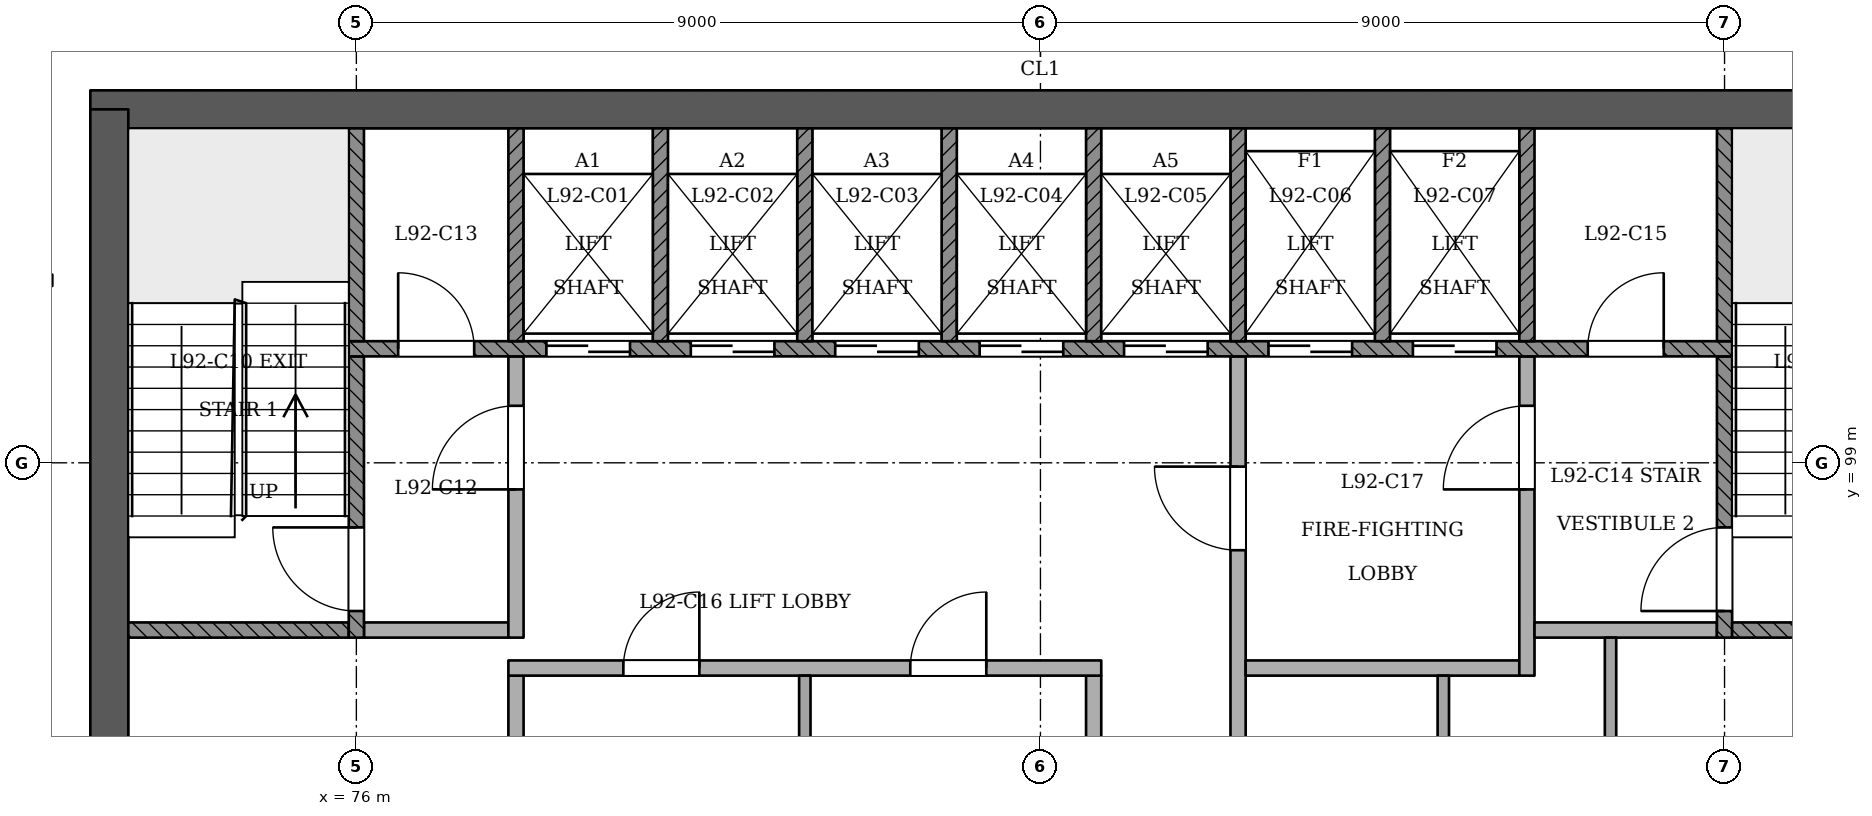
"""IFC4 building model, lengths in metres.
Left out: names, types, materials, properties, quantities, classifications, styles, units other than length and angle.
Written with IfcOpenShell. Run it as: python <this file> out.ifc"""

import sys

from ifc_helpers import new_model, si_unit, direction, frame, frame_2d, origin, place, context, subcontext, project, spatial, rectangle, extrude, element, fill, save


model = new_model("IFC4")
c1 = context("Model", 3, precision=1e-05, world=origin(), true_north=direction((0.0, 1.0)))
c2 = subcontext(c1, "Body", "Model", "MODEL_VIEW")
j1 = project(units=[si_unit("LENGTHUNIT", "METRE"), si_unit("PLANEANGLEUNIT", "RADIAN")], contexts=[c1])
p1 = place(None, origin())
s1 = spatial("IfcSite", under=j1, at=p1, CompositionType="ELEMENT")
p2 = place(p1, origin())
s2 = spatial("IfcBuilding", under=s1, at=p2, CompositionType="ELEMENT")
p3 = place(p2, frame((0.0, 0.0, 354.4)))
s3 = spatial("IfcBuildingStorey", under=s2, at=p3, CompositionType="ELEMENT", Elevation=354.4)
p4 = place(p3, frame((97.25, 103.65, 0.0), z_axis=(0.0, 0.0, 1.0), x_axis=(-1.0, 0.0, 0.0)))
e1 = element("IfcWall", 1, at=p4, inside=s3, PredefinedType="SHEAR", context=c2, shape_type="SweptSolid", body=[
    extrude(rectangle(XDim=24.75, YDim=0.5, at=frame_2d((12.375, 0.0))), origin(), (0.0, 0.0, 1.0), 3.6),
])
p5 = place(p3, frame((72.75, 103.65, 0.0), z_axis=(0.0, 0.0, 1.0), x_axis=(0.0, -1.0, 0.0)))
e2 = element("IfcWall", 2, at=p5, inside=s3, PredefinedType="SHEAR", context=c2, shape_type="SweptSolid", body=[
    extrude(rectangle(XDim=10.75, YDim=0.5, at=frame_2d((5.375, 0.0))), origin(), (0.0, 0.0, 1.0), 3.6),
])
p6 = place(p3, frame((78.1, 93.4, 0.0), z_axis=(0.0, 0.0, 1.0), x_axis=(0.0, 1.0, 0.0)))
e3 = element("IfcWall", 3, at=p6, inside=s3, PredefinedType="PARTITIONING", context=c2, shape_type="SweptSolid", body=[
    extrude(rectangle(XDim=2.8, YDim=0.2, at=frame_2d((1.4, 0.0))), origin(), (0.0, 0.0, 1.0), 3.3),
])
p7 = place(p3, frame((81.9, 93.4, 0.0), z_axis=(0.0, 0.0, 1.0), x_axis=(0.0, 1.0, 0.0)))
e4 = element("IfcWall", 4, at=p7, inside=s3, PredefinedType="PARTITIONING", context=c2, shape_type="SweptSolid", body=[
    extrude(rectangle(XDim=2.8, YDim=0.15, at=frame_2d((1.4, 0.0))), origin(), (0.0, 0.0, 1.0), 3.3),
])
p8 = place(p3, frame((85.7, 93.4, 0.0), z_axis=(0.0, 0.0, 1.0), x_axis=(0.0, 1.0, 0.0)))
e5 = element("IfcWall", 5, at=p8, inside=s3, PredefinedType="PARTITIONING", context=c2, shape_type="SweptSolid", body=[
    extrude(rectangle(XDim=2.8, YDim=0.2, at=frame_2d((1.4, 0.0))), origin(), (0.0, 0.0, 1.0), 3.3),
])
p9 = place(p3, frame((87.6, 93.4, 0.0), z_axis=(0.0, 0.0, 1.0), x_axis=(0.0, 1.0, 0.0)))
e6 = element("IfcWall", 6, at=p9, inside=s3, PredefinedType="PARTITIONING", context=c2, shape_type="SweptSolid", body=[
    extrude(rectangle(XDim=7.0, YDim=0.2, at=frame_2d((3.5, 0.0))), origin(), (0.0, 0.0, 1.0), 3.3),
])
p10 = place(p9, frame((4.45, 0.0, 0.0)))
e7 = element("IfcOpeningElement", 7, at=p10, cuts=e6, PredefinedType="OPENING", context=c2, shape_type="SweptSolid", body=[
    extrude(rectangle(XDim=1.1, YDim=2.1, at=frame_2d((0.55, 1.05))), frame((0.0, 0.11, 0.0), z_axis=(0.0, -1.0, 0.0), x_axis=(1.0, 0.0, 0.0)), (0.0, 0.0, 1.0), 0.221),
])
p11 = place(p3, frame((90.3, 93.4, 0.0), z_axis=(0.0, 0.0, 1.0), x_axis=(0.0, 1.0, 0.0)))
e8 = element("IfcWall", 8, at=p11, inside=s3, PredefinedType="PARTITIONING", context=c2, shape_type="SweptSolid", body=[
    extrude(rectangle(XDim=2.8, YDim=0.15, at=frame_2d((1.4, 0.0))), origin(), (0.0, 0.0, 1.0), 3.3),
])
p12 = place(p3, frame((92.5, 93.4, 0.0), z_axis=(0.0, 0.0, 1.0), x_axis=(0.0, 1.0, 0.0)))
e9 = element("IfcWall", 9, at=p12, inside=s3, PredefinedType="PARTITIONING", context=c2, shape_type="SweptSolid", body=[
    extrude(rectangle(XDim=3.3, YDim=0.15, at=frame_2d((1.65, 0.0))), origin(), (0.0, 0.0, 1.0), 3.3),
])
p13 = place(p3, frame((78.0, 96.3, 0.0), z_axis=(0.0, 0.0, 1.0), x_axis=(1.0, 0.0, 0.0)))
e10 = element("IfcWall", 10, at=p13, inside=s3, PredefinedType="PARTITIONING", context=c2, shape_type="SweptSolid", body=[
    extrude(rectangle(XDim=7.8, YDim=0.2, at=frame_2d((3.9, 0.0))), origin(), (0.0, 0.0, 1.0), 3.3),
])
p14 = place(p13, frame((1.512, 0.0, 0.0)))
e11 = element("IfcOpeningElement", 11, at=p14, cuts=e10, PredefinedType="OPENING", context=c2, shape_type="SweptSolid", body=[
    extrude(rectangle(XDim=1.0, YDim=2.1, at=frame_2d((0.5, 1.05))), frame((0.0, 0.11, 0.0), z_axis=(0.0, -1.0, 0.0), x_axis=(1.0, 0.0, 0.0)), (0.0, 0.0, 1.0), 0.221),
])
p15 = place(p13, frame((5.288, 0.0, 0.0)))
e12 = element("IfcOpeningElement", 12, at=p15, cuts=e10, PredefinedType="OPENING", context=c2, shape_type="SweptSolid", body=[
    extrude(rectangle(XDim=1.0, YDim=2.1, at=frame_2d((0.5, 1.05))), frame((0.0, 0.11, 0.0), z_axis=(0.0, -1.0, 0.0), x_axis=(1.0, 0.0, 0.0)), (0.0, 0.0, 1.0), 0.221),
])
p16 = place(p3, frame((87.7, 96.3, 0.0), z_axis=(0.0, 0.0, 1.0), x_axis=(1.0, 0.0, 0.0)))
e13 = element("IfcWall", 13, at=p16, inside=s3, PredefinedType="PARTITIONING", context=c2, shape_type="SweptSolid", body=[
    extrude(rectangle(XDim=3.6, YDim=0.2, at=frame_2d((1.8, 0.0))), origin(), (0.0, 0.0, 1.0), 3.3),
])
p17 = place(p3, frame((91.4, 96.2, 0.0), z_axis=(0.0, 0.0, 1.0), x_axis=(0.0, 1.0, 0.0)))
e14 = element("IfcWall", 14, at=p17, inside=s3, PredefinedType="PARTITIONING", context=c2, shape_type="SweptSolid", body=[
    extrude(rectangle(XDim=4.2, YDim=0.2, at=frame_2d((2.1, 0.0))), origin(), (0.0, 0.0, 1.0), 3.3),
])
p18 = place(p17, frame((2.45, 0.0, 0.0)))
e15 = element("IfcOpeningElement", 15, at=p18, cuts=e14, PredefinedType="OPENING", context=c2, shape_type="SweptSolid", body=[
    extrude(rectangle(XDim=1.1, YDim=2.1, at=frame_2d((0.55, 1.05))), frame((0.0, 0.11, 0.0), z_axis=(0.0, -1.0, 0.0), x_axis=(1.0, 0.0, 0.0)), (0.0, 0.0, 1.0), 0.221),
])
p19 = place(p3, frame((73.0, 96.8, 0.0), z_axis=(0.0, 0.0, 1.0), x_axis=(1.0, 0.0, 0.0)))
e16 = element("IfcWall", 16, at=p19, inside=s3, PredefinedType="SOLIDWALL", context=c2, shape_type="SweptSolid", body=[
    extrude(rectangle(XDim=2.9, YDim=0.2, at=frame_2d((1.45, 0.0))), origin(), (0.0, 0.0, 1.0), 3.3),
])
p20 = place(p3, frame((76.0, 96.7, 0.0), z_axis=(0.0, 0.0, 1.0), x_axis=(0.0, 1.0, 0.0)))
e17 = element("IfcWall", 17, at=p20, inside=s3, PredefinedType="SOLIDWALL", context=c2, shape_type="SweptSolid", body=[
    extrude(rectangle(XDim=3.7, YDim=0.2, at=frame_2d((1.85, 0.0))), origin(), (0.0, 0.0, 1.0), 3.3),
])
p21 = place(p20, frame((0.35, 0.0, 0.0)))
e18 = element("IfcOpeningElement", 18, at=p21, cuts=e17, PredefinedType="OPENING", context=c2, shape_type="SweptSolid", body=[
    extrude(rectangle(XDim=1.1, YDim=2.1, at=frame_2d((0.55, 1.05))), frame((0.0, 0.11, 0.0), z_axis=(0.0, -1.0, 0.0), x_axis=(1.0, 0.0, 0.0)), (0.0, 0.0, 1.0), 0.221),
])
p22 = place(p3, frame((76.1, 96.8, 0.0), z_axis=(0.0, 0.0, 1.0), x_axis=(1.0, 0.0, 0.0)))
e19 = element("IfcWall", 19, at=p22, inside=s3, PredefinedType="PARTITIONING", context=c2, shape_type="SweptSolid", body=[
    extrude(rectangle(XDim=1.9, YDim=0.2, at=frame_2d((0.95, 0.0))), origin(), (0.0, 0.0, 1.0), 3.3),
])
p23 = place(p3, frame((78.1, 96.7, 0.0), z_axis=(0.0, 0.0, 1.0), x_axis=(0.0, 1.0, 0.0)))
e20 = element("IfcWall", 20, at=p23, inside=s3, PredefinedType="PARTITIONING", context=c2, shape_type="SweptSolid", body=[
    extrude(rectangle(XDim=3.7, YDim=0.2, at=frame_2d((1.85, 0.0))), origin(), (0.0, 0.0, 1.0), 3.3),
])
p24 = place(p23, frame((1.95, 0.0, 0.0)))
e21 = element("IfcOpeningElement", 21, at=p24, cuts=e20, PredefinedType="OPENING", context=c2, shape_type="SweptSolid", body=[
    extrude(rectangle(XDim=1.1, YDim=2.1, at=frame_2d((0.55, 1.05))), frame((0.0, 0.11, 0.0), z_axis=(0.0, -1.0, 0.0), x_axis=(1.0, 0.0, 0.0)), (0.0, 0.0, 1.0), 0.221),
])
p25 = place(p3, frame((91.5, 96.8, 0.0), z_axis=(0.0, 0.0, 1.0), x_axis=(1.0, 0.0, 0.0)))
e22 = element("IfcWall", 22, at=p25, inside=s3, PredefinedType="PARTITIONING", context=c2, shape_type="SweptSolid", body=[
    extrude(rectangle(XDim=2.4, YDim=0.2, at=frame_2d((1.2, 0.0))), origin(), (0.0, 0.0, 1.0), 3.3),
])
p26 = place(p3, frame((94.0, 96.7, 0.0), z_axis=(0.0, 0.0, 1.0), x_axis=(0.0, 1.0, 0.0)))
e23 = element("IfcWall", 23, at=p26, inside=s3, PredefinedType="SOLIDWALL", context=c2, shape_type="SweptSolid", body=[
    extrude(rectangle(XDim=3.7, YDim=0.2, at=frame_2d((1.85, 0.0))), origin(), (0.0, 0.0, 1.0), 3.3),
])
p27 = place(p26, frame((0.35, 0.0, 0.0)))
e24 = element("IfcOpeningElement", 24, at=p27, cuts=e23, PredefinedType="OPENING", context=c2, shape_type="SweptSolid", body=[
    extrude(rectangle(XDim=1.1, YDim=2.1, at=frame_2d((0.55, 1.05))), frame((0.0, 0.11, 0.0), z_axis=(0.0, -1.0, 0.0), x_axis=(1.0, 0.0, 0.0)), (0.0, 0.0, 1.0), 0.221),
])
p28 = place(p3, frame((94.1, 96.8, 0.0), z_axis=(0.0, 0.0, 1.0), x_axis=(1.0, 0.0, 0.0)))
e25 = element("IfcWall", 25, at=p28, inside=s3, PredefinedType="SOLIDWALL", context=c2, shape_type="SweptSolid", body=[
    extrude(rectangle(XDim=2.9, YDim=0.2, at=frame_2d((1.45, 0.0))), origin(), (0.0, 0.0, 1.0), 3.3),
])
p29 = place(p3, frame((75.9, 100.5, 0.0), z_axis=(0.0, 0.0, 1.0), x_axis=(1.0, 0.0, 0.0)))
e26 = element("IfcWall", 26, at=p29, inside=s3, PredefinedType="SOLIDWALL", context=c2, shape_type="SweptSolid", body=[
    extrude(rectangle(XDim=18.2, YDim=0.2, at=frame_2d((9.1, 0.0))), origin(), (0.0, 0.0, 1.0), 3.3),
])
p30 = place(p29, frame((2.6, 0.0, 0.0)))
e27 = element("IfcOpeningElement", 27, at=p30, cuts=e26, PredefinedType="OPENING", context=c2, shape_type="SweptSolid", body=[
    extrude(rectangle(XDim=1.1, YDim=2.1, at=frame_2d((0.55, 1.05))), frame((0.0, 0.11, 0.0), z_axis=(0.0, -1.0, 0.0), x_axis=(1.0, 0.0, 0.0)), (0.0, 0.0, 1.0), 0.221),
])
p31 = place(p29, frame((4.5, 0.0, 0.0)))
e28 = element("IfcOpeningElement", 28, at=p31, cuts=e26, PredefinedType="OPENING", context=c2, shape_type="SweptSolid", body=[
    extrude(rectangle(XDim=1.1, YDim=2.1, at=frame_2d((0.55, 1.05))), frame((0.0, 0.11, 0.0), z_axis=(0.0, -1.0, 0.0), x_axis=(1.0, 0.0, 0.0)), (0.0, 0.0, 1.0), 0.221),
])
p32 = place(p29, frame((6.4, 0.0, 0.0)))
e29 = element("IfcOpeningElement", 29, at=p32, cuts=e26, PredefinedType="OPENING", context=c2, shape_type="SweptSolid", body=[
    extrude(rectangle(XDim=1.1, YDim=2.1, at=frame_2d((0.55, 1.05))), frame((0.0, 0.11, 0.0), z_axis=(0.0, -1.0, 0.0), x_axis=(1.0, 0.0, 0.0)), (0.0, 0.0, 1.0), 0.221),
])
p33 = place(p29, frame((8.3, 0.0, 0.0)))
e30 = element("IfcOpeningElement", 30, at=p33, cuts=e26, PredefinedType="OPENING", context=c2, shape_type="SweptSolid", body=[
    extrude(rectangle(XDim=1.1, YDim=2.1, at=frame_2d((0.55, 1.05))), frame((0.0, 0.11, 0.0), z_axis=(0.0, -1.0, 0.0), x_axis=(1.0, 0.0, 0.0)), (0.0, 0.0, 1.0), 0.221),
])
p34 = place(p29, frame((10.2, 0.0, 0.0)))
e31 = element("IfcOpeningElement", 31, at=p34, cuts=e26, PredefinedType="OPENING", context=c2, shape_type="SweptSolid", body=[
    extrude(rectangle(XDim=1.1, YDim=2.1, at=frame_2d((0.55, 1.05))), frame((0.0, 0.11, 0.0), z_axis=(0.0, -1.0, 0.0), x_axis=(1.0, 0.0, 0.0)), (0.0, 0.0, 1.0), 0.221),
])
p35 = place(p29, frame((12.1, 0.0, 0.0)))
e32 = element("IfcOpeningElement", 32, at=p35, cuts=e26, PredefinedType="OPENING", context=c2, shape_type="SweptSolid", body=[
    extrude(rectangle(XDim=1.1, YDim=2.1, at=frame_2d((0.55, 1.05))), frame((0.0, 0.11, 0.0), z_axis=(0.0, -1.0, 0.0), x_axis=(1.0, 0.0, 0.0)), (0.0, 0.0, 1.0), 0.221),
])
p36 = place(p29, frame((14.0, 0.0, 0.0)))
e33 = element("IfcOpeningElement", 33, at=p36, cuts=e26, PredefinedType="OPENING", context=c2, shape_type="SweptSolid", body=[
    extrude(rectangle(XDim=1.1, YDim=2.1, at=frame_2d((0.55, 1.05))), frame((0.0, 0.11, 0.0), z_axis=(0.0, -1.0, 0.0), x_axis=(1.0, 0.0, 0.0)), (0.0, 0.0, 1.0), 0.221),
])
p37 = place(p29, frame((0.65, 0.0, 0.0)))
e34 = element("IfcOpeningElement", 34, at=p37, cuts=e26, PredefinedType="OPENING", context=c2, shape_type="SweptSolid", body=[
    extrude(rectangle(XDim=1.0, YDim=2.1, at=frame_2d((0.5, 1.05))), frame((0.0, 0.11, 0.0), z_axis=(0.0, -1.0, 0.0), x_axis=(1.0, 0.0, 0.0)), (0.0, 0.0, 1.0), 0.221),
])
p38 = place(p29, frame((16.3, 0.0, 0.0)))
e35 = element("IfcOpeningElement", 35, at=p38, cuts=e26, PredefinedType="OPENING", context=c2, shape_type="SweptSolid", body=[
    extrude(rectangle(XDim=1.0, YDim=2.1, at=frame_2d((0.5, 1.05))), frame((0.0, 0.11, 0.0), z_axis=(0.0, -1.0, 0.0), x_axis=(1.0, 0.0, 0.0)), (0.0, 0.0, 1.0), 0.221),
])
for number, where, z_axis, x_axis in (
    (36, (76.0, 100.6, 0.0), (0.0, 0.0, 1.0), (0.0, 1.0, 0.0)),
    (37, (78.1, 100.6, 0.0), (0.0, 0.0, 1.0), (0.0, 1.0, 0.0)),
    (38, (80.0, 100.6, 0.0), (0.0, 0.0, 1.0), (0.0, 1.0, 0.0)),
    (39, (81.9, 100.6, 0.0), (0.0, 0.0, 1.0), (0.0, 1.0, 0.0)),
    (40, (83.8, 100.6, 0.0), (0.0, 0.0, 1.0), (0.0, 1.0, 0.0)),
    (41, (85.7, 100.6, 0.0), (0.0, 0.0, 1.0), (0.0, 1.0, 0.0)),
    (42, (87.6, 100.6, 0.0), (0.0, 0.0, 1.0), (0.0, 1.0, 0.0)),
    (43, (89.5, 100.6, 0.0), (0.0, 0.0, 1.0), (0.0, 1.0, 0.0)),
    (44, (91.4, 100.6, 0.0), (0.0, 0.0, 1.0), (0.0, 1.0, 0.0)),
    (45, (94.0, 100.6, 0.0), (0.0, 0.0, 1.0), (0.0, 1.0, 0.0)),
):
    element("IfcWall", number, at=place(p3, frame(where, z_axis=z_axis, x_axis=x_axis)), inside=s3, PredefinedType="SOLIDWALL", context=c2, shape_type="SweptSolid", body=[
        extrude(rectangle(XDim=2.8, YDim=0.2, at=frame_2d((1.4, 0.0))), origin(), (0.0, 0.0, 1.0), 3.3),
    ])
p39 = place(p30, origin())
e46 = element("IfcDoor", 46, at=p39, inside=s3, OperationType="SLIDING_TO_RIGHT", PredefinedType="NOTDEFINED", context=c2, shape_type="SweptSolid", body=[
    extrude(rectangle(XDim=1.1, YDim=2.1, at=frame_2d((0.55, 1.05))), frame((0.0, 0.025, 0.0), z_axis=(0.0, -1.0, 0.0), x_axis=(1.0, 0.0, 0.0)), (0.0, 0.0, 1.0), 0.05),
])
fill(e27, e46)
p40 = place(p31, origin())
e47 = element("IfcDoor", 47, at=p40, inside=s3, OperationType="SLIDING_TO_LEFT", PredefinedType="NOTDEFINED", context=c2, shape_type="SweptSolid", body=[
    extrude(rectangle(XDim=1.1, YDim=2.1, at=frame_2d((0.55, 1.05))), frame((0.0, 0.025, 0.0), z_axis=(0.0, -1.0, 0.0), x_axis=(1.0, 0.0, 0.0)), (0.0, 0.0, 1.0), 0.05),
])
fill(e28, e47)
p41 = place(p32, origin())
e48 = element("IfcDoor", 48, at=p41, inside=s3, OperationType="SLIDING_TO_RIGHT", PredefinedType="NOTDEFINED", context=c2, shape_type="SweptSolid", body=[
    extrude(rectangle(XDim=1.1, YDim=2.1, at=frame_2d((0.55, 1.05))), frame((0.0, 0.025, 0.0), z_axis=(0.0, -1.0, 0.0), x_axis=(1.0, 0.0, 0.0)), (0.0, 0.0, 1.0), 0.05),
])
fill(e29, e48)
p42 = place(p33, origin())
e49 = element("IfcDoor", 49, at=p42, inside=s3, OperationType="SLIDING_TO_LEFT", PredefinedType="NOTDEFINED", context=c2, shape_type="SweptSolid", body=[
    extrude(rectangle(XDim=1.1, YDim=2.1, at=frame_2d((0.55, 1.05))), frame((0.0, 0.025, 0.0), z_axis=(0.0, -1.0, 0.0), x_axis=(1.0, 0.0, 0.0)), (0.0, 0.0, 1.0), 0.05),
])
fill(e30, e49)
p43 = place(p34, origin())
e50 = element("IfcDoor", 50, at=p43, inside=s3, OperationType="SLIDING_TO_RIGHT", PredefinedType="NOTDEFINED", context=c2, shape_type="SweptSolid", body=[
    extrude(rectangle(XDim=1.1, YDim=2.1, at=frame_2d((0.55, 1.05))), frame((0.0, 0.025, 0.0), z_axis=(0.0, -1.0, 0.0), x_axis=(1.0, 0.0, 0.0)), (0.0, 0.0, 1.0), 0.05),
])
fill(e31, e50)
p44 = place(p35, origin())
e51 = element("IfcDoor", 51, at=p44, inside=s3, OperationType="SLIDING_TO_RIGHT", PredefinedType="NOTDEFINED", context=c2, shape_type="SweptSolid", body=[
    extrude(rectangle(XDim=1.1, YDim=2.1, at=frame_2d((0.55, 1.05))), frame((0.0, 0.025, 0.0), z_axis=(0.0, -1.0, 0.0), x_axis=(1.0, 0.0, 0.0)), (0.0, 0.0, 1.0), 0.05),
])
fill(e32, e51)
p45 = place(p36, origin())
e52 = element("IfcDoor", 52, at=p45, inside=s3, OperationType="SLIDING_TO_LEFT", PredefinedType="NOTDEFINED", context=c2, shape_type="SweptSolid", body=[
    extrude(rectangle(XDim=1.1, YDim=2.1, at=frame_2d((0.55, 1.05))), frame((0.0, 0.025, 0.0), z_axis=(0.0, -1.0, 0.0), x_axis=(1.0, 0.0, 0.0)), (0.0, 0.0, 1.0), 0.05),
])
fill(e33, e52)
p46 = place(p21, origin())
e53 = element("IfcDoor", 53, at=p46, inside=s3, OperationType="SINGLE_SWING_RIGHT", PredefinedType="NOTDEFINED", context=c2, shape_type="SweptSolid", body=[
    extrude(rectangle(XDim=1.1, YDim=2.1, at=frame_2d((0.55, 1.05))), frame((0.0, 0.025, 0.0), z_axis=(0.0, -1.0, 0.0), x_axis=(1.0, 0.0, 0.0)), (0.0, 0.0, 1.0), 0.05),
])
fill(e18, e53)
p47 = place(p27, origin())
e54 = element("IfcDoor", 54, at=p47, inside=s3, OperationType="SINGLE_SWING_LEFT", PredefinedType="NOTDEFINED", context=c2, shape_type="SweptSolid", body=[
    extrude(rectangle(XDim=1.1, YDim=2.1, at=frame_2d((0.55, 1.05))), frame((0.0, 0.025, 0.0), z_axis=(0.0, -1.0, 0.0), x_axis=(1.0, 0.0, 0.0)), (0.0, 0.0, 1.0), 0.05),
])
fill(e24, e54)
p48 = place(p24, origin())
e55 = element("IfcDoor", 55, at=p48, inside=s3, OperationType="SINGLE_SWING_LEFT", PredefinedType="NOTDEFINED", context=c2, shape_type="SweptSolid", body=[
    extrude(rectangle(XDim=1.1, YDim=2.1, at=frame_2d((0.55, 1.05))), frame((0.0, 0.025, 0.0), z_axis=(0.0, -1.0, 0.0), x_axis=(1.0, 0.0, 0.0)), (0.0, 0.0, 1.0), 0.05),
])
fill(e21, e55)
p49 = place(p10, origin())
e56 = element("IfcDoor", 56, at=p49, inside=s3, OperationType="SINGLE_SWING_RIGHT", PredefinedType="NOTDEFINED", context=c2, shape_type="SweptSolid", body=[
    extrude(rectangle(XDim=1.1, YDim=2.1, at=frame_2d((0.55, 1.05))), frame((0.0, 0.025, 0.0), z_axis=(0.0, -1.0, 0.0), x_axis=(1.0, 0.0, 0.0)), (0.0, 0.0, 1.0), 0.05),
])
fill(e7, e56)
p50 = place(p18, origin())
e57 = element("IfcDoor", 57, at=p50, inside=s3, OperationType="SINGLE_SWING_LEFT", PredefinedType="NOTDEFINED", context=c2, shape_type="SweptSolid", body=[
    extrude(rectangle(XDim=1.1, YDim=2.1, at=frame_2d((0.55, 1.05))), frame((0.0, 0.025, 0.0), z_axis=(0.0, -1.0, 0.0), x_axis=(1.0, 0.0, 0.0)), (0.0, 0.0, 1.0), 0.05),
])
fill(e15, e57)
p51 = place(p37, origin())
e58 = element("IfcDoor", 58, at=p51, inside=s3, OperationType="SINGLE_SWING_LEFT", PredefinedType="NOTDEFINED", context=c2, shape_type="SweptSolid", body=[
    extrude(rectangle(XDim=1.0, YDim=2.1, at=frame_2d((0.5, 1.05))), frame((0.0, 0.025, 0.0), z_axis=(0.0, -1.0, 0.0), x_axis=(1.0, 0.0, 0.0)), (0.0, 0.0, 1.0), 0.05),
])
fill(e34, e58)
p52 = place(p38, origin())
e59 = element("IfcDoor", 59, at=p52, inside=s3, OperationType="SINGLE_SWING_RIGHT", PredefinedType="NOTDEFINED", context=c2, shape_type="SweptSolid", body=[
    extrude(rectangle(XDim=1.0, YDim=2.1, at=frame_2d((0.5, 1.05))), frame((0.0, 0.025, 0.0), z_axis=(0.0, -1.0, 0.0), x_axis=(1.0, 0.0, 0.0)), (0.0, 0.0, 1.0), 0.05),
])
fill(e35, e59)
p53 = place(p14, origin())
e60 = element("IfcDoor", 60, at=p53, inside=s3, OperationType="SINGLE_SWING_RIGHT", PredefinedType="NOTDEFINED", context=c2, shape_type="SweptSolid", body=[
    extrude(rectangle(XDim=1.0, YDim=2.1, at=frame_2d((0.5, 1.05))), frame((0.0, 0.025, 0.0), z_axis=(0.0, -1.0, 0.0), x_axis=(1.0, 0.0, 0.0)), (0.0, 0.0, 1.0), 0.05),
])
fill(e11, e60)
p54 = place(p15, origin())
e61 = element("IfcDoor", 61, at=p54, inside=s3, OperationType="SINGLE_SWING_RIGHT", PredefinedType="NOTDEFINED", context=c2, shape_type="SweptSolid", body=[
    extrude(rectangle(XDim=1.0, YDim=2.1, at=frame_2d((0.5, 1.05))), frame((0.0, 0.025, 0.0), z_axis=(0.0, -1.0, 0.0), x_axis=(1.0, 0.0, 0.0)), (0.0, 0.0, 1.0), 0.05),
])
fill(e12, e61)
save(model, sys.argv[1])
